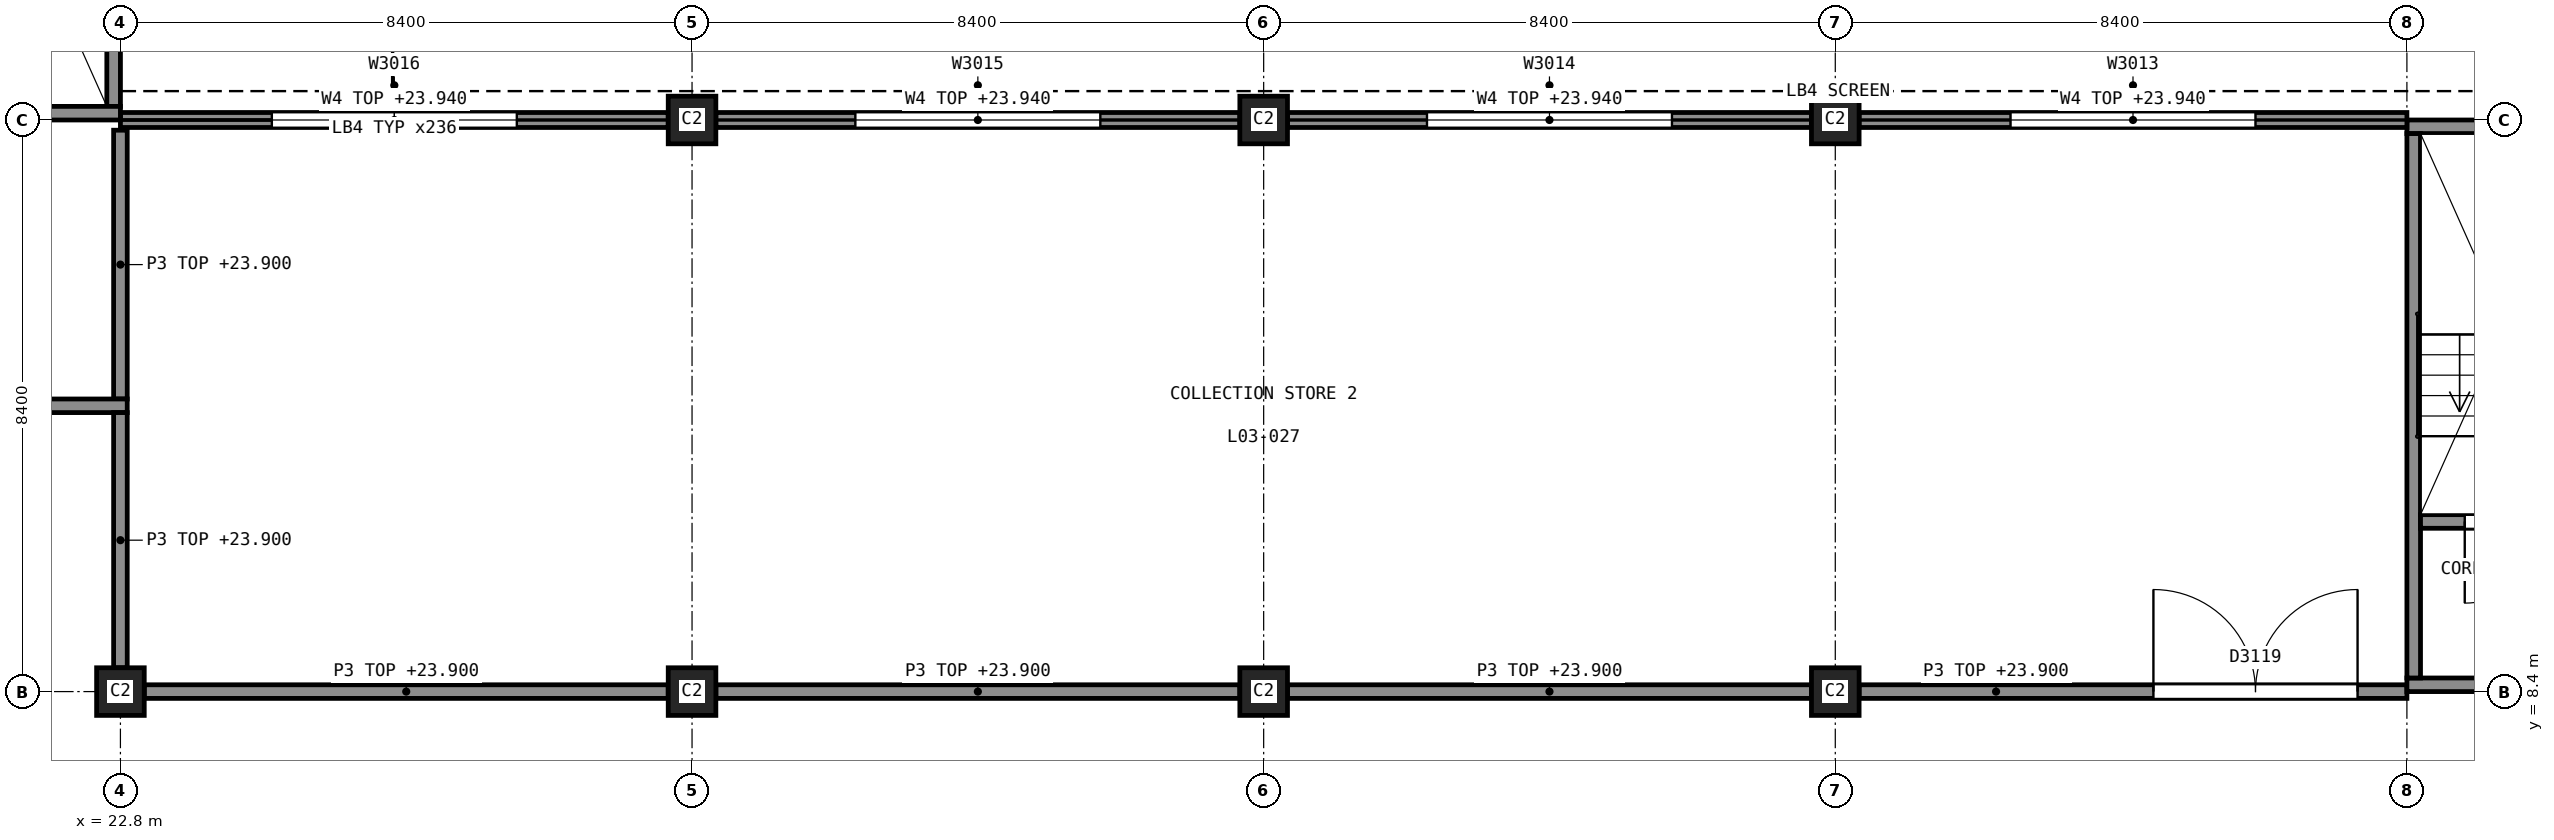
"""IFC4 building model, lengths in metres.
Left out: names, types, materials, properties, quantities, classifications, styles, units other than length and angle.
Written with IfcOpenShell. Run it as: python <this file> out.ifc"""

import sys

from ifc_helpers import new_model, si_unit, direction, frame, frame_2d, origin, origin_2d, place, context, subcontext, project, spatial, rectangle, extrude, element, fill, save


model = new_model("IFC4")
c1 = context("Model", 3, precision=1e-05, world=origin(), true_north=direction((0.0, 1.0)))
c2 = subcontext(c1, "Body", "Model", "MODEL_VIEW")
j1 = project(units=[si_unit("LENGTHUNIT", "METRE"), si_unit("PLANEANGLEUNIT", "RADIAN")], contexts=[c1])
p1 = place(None, origin())
s1 = spatial("IfcSite", under=j1, at=p1, CompositionType="ELEMENT")
p2 = place(p1, origin())
s2 = spatial("IfcBuilding", under=s1, at=p2, CompositionType="ELEMENT")
p3 = place(p2, frame((0.0, 0.0, 20.0)))
s3 = spatial("IfcBuildingStorey", under=s2, at=p3, CompositionType="ELEMENT", Elevation=20.0)
p4 = place(p3, frame((14.4, 16.9, 0.0), z_axis=(0.0, 0.0, 1.0), x_axis=(1.0, 0.0, 0.0)))
e1 = element("IfcWall", 1, at=p4, inside=s3, PredefinedType="SHEAR", context=c2, shape_type="SweptSolid", body=[
    extrude(rectangle(XDim=8.4, YDim=0.2, at=frame_2d((4.2, 0.0))), origin(), (0.0, 0.0, 1.0), 8.8),
])
p5 = place(p3, frame((22.7, 17.0, 0.0), z_axis=(0.0, 0.0, 1.0), x_axis=(0.0, 1.0, 0.0)))
e2 = element("IfcWall", 2, at=p5, inside=s3, PredefinedType="SHEAR", context=c2, shape_type="SweptSolid", body=[
    extrude(rectangle(XDim=8.0, YDim=0.2, at=frame_2d((4.0, 0.0))), origin(), (0.0, 0.0, 1.0), 8.775),
])
p6 = place(p3, frame((56.4, 8.5, 0.0), z_axis=(0.0, 0.0, 1.0), x_axis=(1.0, 0.0, 0.0)))
e3 = element("IfcWall", 3, at=p6, inside=s3, PredefinedType="SHEAR", context=c2, shape_type="SweptSolid", body=[
    extrude(rectangle(XDim=8.4, YDim=0.2, at=frame_2d((4.2, 0.0))), origin(), (0.0, 0.0, 1.0), 5.0),
])
p7 = place(p6, frame((3.3, 0.0, 0.0)))
e4 = element("IfcOpeningElement", 4, at=p7, cuts=e3, PredefinedType="OPENING", context=c2, shape_type="SweptSolid", body=[
    extrude(rectangle(XDim=1.8, YDim=2.1, at=frame_2d((0.9, 1.05))), frame((0.0, 0.11, 0.0), z_axis=(0.0, -1.0, 0.0), x_axis=(1.0, 0.0, 0.0)), (0.0, 0.0, 1.0), 0.22),
])
p8 = place(p3, frame((56.4, 16.7, 0.0), z_axis=(0.0, 0.0, 1.0), x_axis=(1.0, 0.0, 0.0)))
e5 = element("IfcWall", 5, at=p8, inside=s3, PredefinedType="SHEAR", context=c2, shape_type="SweptSolid", body=[
    extrude(rectangle(XDim=8.4, YDim=0.2, at=frame_2d((4.2, 0.0))), origin(), (0.0, 0.0, 1.0), 5.0),
])
p9 = place(p3, frame((56.5, 8.6, 0.0), z_axis=(0.0, 0.0, 1.0), x_axis=(0.0, 1.0, 0.0)))
e6 = element("IfcWall", 6, at=p9, inside=s3, PredefinedType="SHEAR", context=c2, shape_type="SweptSolid", body=[
    extrude(rectangle(XDim=8.0, YDim=0.2, at=frame_2d((4.0, 0.0))), origin(), (0.0, 0.0, 1.0), 5.0),
])
p10 = place(p3, frame((56.6, 10.9, 0.0), z_axis=(0.0, 0.0, 1.0), x_axis=(1.0, 0.0, 0.0)))
e7 = element("IfcWall", 7, at=p10, inside=s3, PredefinedType="SHEAR", context=c2, shape_type="SweptSolid", body=[
    extrude(rectangle(XDim=8.0, YDim=0.2, at=frame_2d((4.0, 0.0))), origin(), (0.0, 0.0, 1.0), 5.0),
])
p11 = place(p10, frame((0.65, 0.0, 0.0)))
e8 = element("IfcOpeningElement", 8, at=p11, cuts=e7, PredefinedType="OPENING", context=c2, shape_type="SweptSolid", body=[
    extrude(rectangle(XDim=1.2, YDim=2.1, at=frame_2d((0.6, 1.05))), frame((0.0, 0.11, 0.0), z_axis=(0.0, -1.0, 0.0), x_axis=(1.0, 0.0, 0.0)), (0.0, 0.0, 1.0), 0.22),
])
p12 = place(p10, frame((6.15, 0.0, 0.0)))
e9 = element("IfcOpeningElement", 9, at=p12, cuts=e7, PredefinedType="OPENING", context=c2, shape_type="SweptSolid", body=[
    extrude(rectangle(XDim=1.2, YDim=2.1, at=frame_2d((0.6, 1.05))), frame((0.0, 0.11, 0.0), z_axis=(0.0, -1.0, 0.0), x_axis=(1.0, 0.0, 0.0)), (0.0, 0.0, 1.0), 0.22),
])
p13 = place(p10, frame((3.45, 0.0, 0.0)))
e10 = element("IfcOpeningElement", 10, at=p13, cuts=e7, PredefinedType="OPENING", context=c2, shape_type="SweptSolid", body=[
    extrude(rectangle(XDim=1.1, YDim=2.1, at=frame_2d((0.55, 1.05))), frame((0.0, 0.11, 0.0), z_axis=(0.0, -1.0, 0.0), x_axis=(1.0, 0.0, 0.0)), (0.0, 0.0, 1.0), 0.22),
])
for number, where, z_axis, x_axis in (
    (11, (22.8, 8.4, 0.0), (0.0, 0.0, 1.0), (1.0, 0.0, 0.0)),
    (12, (31.2, 8.4, 0.0), (0.0, 0.0, 1.0), (1.0, 0.0, 0.0)),
    (13, (31.2, 16.8, 0.0), (0.0, 0.0, 1.0), (1.0, 0.0, 0.0)),
    (14, (39.6, 8.4, 0.0), (0.0, 0.0, 1.0), (1.0, 0.0, 0.0)),
    (15, (39.6, 16.8, 0.0), (0.0, 0.0, 1.0), (1.0, 0.0, 0.0)),
    (16, (48.0, 8.4, 0.0), (0.0, 0.0, 1.0), (1.0, 0.0, 0.0)),
    (17, (48.0, 16.8, 0.0), (0.0, 0.0, 1.0), (1.0, 0.0, 0.0)),
):
    element("IfcColumn", number, at=place(p3, frame(where, z_axis=z_axis, x_axis=x_axis)), inside=s3, PredefinedType="COLUMN", context=c2, shape_type="SweptSolid", body=[
        extrude(rectangle(XDim=0.7, YDim=0.7, at=origin_2d()), origin(), (0.0, 0.0, 1.0), 5.0),
    ])
p14 = place(p3, frame((48.35, 16.8, 0.0), z_axis=(0.0, 0.0, 1.0), x_axis=(1.0, 0.0, 0.0)))
e18 = element("IfcWall", 18, at=p14, inside=s3, PredefinedType="SOLIDWALL", context=c2, shape_type="SweptSolid", body=[
    extrude(rectangle(XDim=8.05, YDim=0.22, at=frame_2d((4.025, 0.0))), origin(), (0.0, 0.0, 1.0), 3.94),
])
p15 = place(p14, frame((2.225, 0.0, 0.9)))
e19 = element("IfcOpeningElement", 19, at=p15, cuts=e18, PredefinedType="OPENING", context=c2, shape_type="SweptSolid", body=[
    extrude(rectangle(XDim=3.6, YDim=1.5, at=frame_2d((1.8, 0.75))), frame((0.0, 0.12, 0.0), z_axis=(0.0, -1.0, 0.0), x_axis=(1.0, 0.0, 0.0)), (0.0, 0.0, 1.0), 0.24),
])
p16 = place(p3, frame((39.95, 16.8, 0.0), z_axis=(0.0, 0.0, 1.0), x_axis=(1.0, 0.0, 0.0)))
e20 = element("IfcWall", 20, at=p16, inside=s3, PredefinedType="SOLIDWALL", context=c2, shape_type="SweptSolid", body=[
    extrude(rectangle(XDim=7.7, YDim=0.22, at=frame_2d((3.85, 0.0))), origin(), (0.0, 0.0, 1.0), 3.94),
])
p17 = place(p16, frame((2.05, 0.0, 0.9)))
e21 = element("IfcOpeningElement", 21, at=p17, cuts=e20, PredefinedType="OPENING", context=c2, shape_type="SweptSolid", body=[
    extrude(rectangle(XDim=3.6, YDim=1.5, at=frame_2d((1.8, 0.75))), frame((0.0, 0.12, 0.0), z_axis=(0.0, -1.0, 0.0), x_axis=(1.0, 0.0, 0.0)), (0.0, 0.0, 1.0), 0.24),
])
p18 = place(p3, frame((31.55, 16.8, 0.0), z_axis=(0.0, 0.0, 1.0), x_axis=(1.0, 0.0, 0.0)))
e22 = element("IfcWall", 22, at=p18, inside=s3, PredefinedType="SOLIDWALL", context=c2, shape_type="SweptSolid", body=[
    extrude(rectangle(XDim=7.7, YDim=0.22, at=frame_2d((3.85, 0.0))), origin(), (0.0, 0.0, 1.0), 3.94),
])
p19 = place(p18, frame((2.05, 0.0, 0.9)))
e23 = element("IfcOpeningElement", 23, at=p19, cuts=e22, PredefinedType="OPENING", context=c2, shape_type="SweptSolid", body=[
    extrude(rectangle(XDim=3.6, YDim=1.5, at=frame_2d((1.8, 0.75))), frame((0.0, 0.12, 0.0), z_axis=(0.0, -1.0, 0.0), x_axis=(1.0, 0.0, 0.0)), (0.0, 0.0, 1.0), 0.24),
])
p20 = place(p3, frame((22.8, 16.8, 0.0), z_axis=(0.0, 0.0, 1.0), x_axis=(1.0, 0.0, 0.0)))
e24 = element("IfcWall", 24, at=p20, inside=s3, PredefinedType="SOLIDWALL", context=c2, shape_type="SweptSolid", body=[
    extrude(rectangle(XDim=8.05, YDim=0.22, at=frame_2d((4.025, 0.0))), origin(), (0.0, 0.0, 1.0), 3.94),
])
p21 = place(p20, frame((2.225, 0.0, 0.9)))
e25 = element("IfcOpeningElement", 25, at=p21, cuts=e24, PredefinedType="OPENING", context=c2, shape_type="SweptSolid", body=[
    extrude(rectangle(XDim=3.6, YDim=1.5, at=frame_2d((1.8, 0.75))), frame((0.0, 0.12, 0.0), z_axis=(0.0, -1.0, 0.0), x_axis=(1.0, 0.0, 0.0)), (0.0, 0.0, 1.0), 0.24),
])
p22 = place(p3, frame((22.8, 12.7, 0.0), z_axis=(0.0, 0.0, 1.0), x_axis=(0.0, 1.0, 0.0)))
e26 = element("IfcWall", 26, at=p22, inside=s3, PredefinedType="PARTITIONING", context=c2, shape_type="SweptSolid", body=[
    extrude(rectangle(XDim=3.95, YDim=0.2, at=frame_2d((1.975, 0.0))), origin(), (0.0, 0.0, 1.0), 3.9),
])
p23 = place(p3, frame((14.4, 12.6, 0.0), z_axis=(0.0, 0.0, 1.0), x_axis=(1.0, 0.0, 0.0)))
e27 = element("IfcWall", 27, at=p23, inside=s3, PredefinedType="PARTITIONING", context=c2, shape_type="SweptSolid", body=[
    extrude(rectangle(XDim=8.5, YDim=0.2, at=frame_2d((4.25, 0.0))), origin(), (0.0, 0.0, 1.0), 3.9),
])
p24 = place(p23, frame((1.775, 0.0, 0.0)))
e28 = element("IfcOpeningElement", 28, at=p24, cuts=e27, PredefinedType="OPENING", context=c2, shape_type="SweptSolid", body=[
    extrude(rectangle(XDim=1.0, YDim=2.1, at=frame_2d((0.5, 1.05))), frame((0.0, 0.11, 0.0), z_axis=(0.0, -1.0, 0.0), x_axis=(1.0, 0.0, 0.0)), (0.0, 0.0, 1.0), 0.22),
])
p25 = place(p3, frame((23.15, 8.4, 0.0), z_axis=(0.0, 0.0, 1.0), x_axis=(1.0, 0.0, 0.0)))
e29 = element("IfcWall", 29, at=p25, inside=s3, PredefinedType="PARTITIONING", context=c2, shape_type="SweptSolid", body=[
    extrude(rectangle(XDim=7.7, YDim=0.2, at=frame_2d((3.85, 0.0))), origin(), (0.0, 0.0, 1.0), 3.9),
])
for number, where, z_axis, x_axis in (
    (30, (31.55, 8.4, 0.0), (0.0, 0.0, 1.0), (1.0, 0.0, 0.0)),
    (31, (39.95, 8.4, 0.0), (0.0, 0.0, 1.0), (1.0, 0.0, 0.0)),
):
    element("IfcWall", number, at=place(p3, frame(where, z_axis=z_axis, x_axis=x_axis)), inside=s3, PredefinedType="PARTITIONING", context=c2, shape_type="SweptSolid", body=[
        extrude(rectangle(XDim=7.7, YDim=0.2, at=frame_2d((3.85, 0.0))), origin(), (0.0, 0.0, 1.0), 3.9),
    ])
p26 = place(p3, frame((48.35, 8.4, 0.0), z_axis=(0.0, 0.0, 1.0), x_axis=(1.0, 0.0, 0.0)))
e32 = element("IfcWall", 32, at=p26, inside=s3, PredefinedType="PARTITIONING", context=c2, shape_type="SweptSolid", body=[
    extrude(rectangle(XDim=8.05, YDim=0.2, at=frame_2d((4.025, 0.0))), origin(), (0.0, 0.0, 1.0), 3.9),
])
p27 = place(p26, frame((4.325, 0.0, 0.0)))
e33 = element("IfcOpeningElement", 33, at=p27, cuts=e32, PredefinedType="OPENING", context=c2, shape_type="SweptSolid", body=[
    extrude(rectangle(XDim=3.0, YDim=3.0, at=frame_2d((1.5, 1.5))), frame((0.0, 0.11, 0.0), z_axis=(0.0, -1.0, 0.0), x_axis=(1.0, 0.0, 0.0)), (0.0, 0.0, 1.0), 0.22),
])
p28 = place(p3, frame((22.8, 8.75, 0.0), z_axis=(0.0, 0.0, 1.0), x_axis=(0.0, 1.0, 0.0)))
e34 = element("IfcWall", 34, at=p28, inside=s3, PredefinedType="PARTITIONING", context=c2, shape_type="SweptSolid", body=[
    extrude(rectangle(XDim=3.75, YDim=0.2, at=frame_2d((1.875, 0.0))), origin(), (0.0, 0.0, 1.0), 3.9),
])
p29 = place(p15, origin())
e35 = element("IfcWindow", 35, at=p29, inside=s3, PartitioningType="DOUBLE_PANEL_VERTICAL", PredefinedType="WINDOW", context=c2, shape_type="SweptSolid", body=[
    extrude(rectangle(XDim=3.6, YDim=1.5, at=frame_2d((1.8, 0.75))), frame((0.0, -0.03, 0.0), z_axis=(0.0, -1.0, 0.0), x_axis=(1.0, 0.0, 0.0)), (0.0, 0.0, 1.0), 0.06),
])
fill(e19, e35)
p30 = place(p17, origin())
e36 = element("IfcWindow", 36, at=p30, inside=s3, PartitioningType="DOUBLE_PANEL_VERTICAL", PredefinedType="WINDOW", context=c2, shape_type="SweptSolid", body=[
    extrude(rectangle(XDim=3.6, YDim=1.5, at=frame_2d((1.8, 0.75))), frame((0.0, -0.03, 0.0), z_axis=(0.0, -1.0, 0.0), x_axis=(1.0, 0.0, 0.0)), (0.0, 0.0, 1.0), 0.06),
])
fill(e21, e36)
p31 = place(p19, origin())
e37 = element("IfcWindow", 37, at=p31, inside=s3, PartitioningType="DOUBLE_PANEL_VERTICAL", PredefinedType="WINDOW", context=c2, shape_type="SweptSolid", body=[
    extrude(rectangle(XDim=3.6, YDim=1.5, at=frame_2d((1.8, 0.75))), frame((0.0, -0.03, 0.0), z_axis=(0.0, -1.0, 0.0), x_axis=(1.0, 0.0, 0.0)), (0.0, 0.0, 1.0), 0.06),
])
fill(e23, e37)
p32 = place(p21, origin())
e38 = element("IfcWindow", 38, at=p32, inside=s3, PartitioningType="DOUBLE_PANEL_VERTICAL", PredefinedType="WINDOW", context=c2, shape_type="SweptSolid", body=[
    extrude(rectangle(XDim=3.6, YDim=1.5, at=frame_2d((1.8, 0.75))), frame((0.0, -0.03, 0.0), z_axis=(0.0, -1.0, 0.0), x_axis=(1.0, 0.0, 0.0)), (0.0, 0.0, 1.0), 0.06),
])
fill(e25, e38)
p33 = place(p27, origin())
e39 = element("IfcDoor", 39, at=p33, inside=s3, OperationType="DOUBLE_DOOR_SINGLE_SWING", PredefinedType="DOOR", context=c2, shape_type="SweptSolid", body=[
    extrude(rectangle(XDim=3.0, YDim=3.0, at=frame_2d((1.5, 1.5))), frame((0.0, 0.025, 0.0), z_axis=(0.0, -1.0, 0.0), x_axis=(1.0, 0.0, 0.0)), (0.0, 0.0, 1.0), 0.05),
])
fill(e33, e39)
p34 = place(p11, origin())
e40 = element("IfcDoor", 40, at=p34, inside=s3, OperationType="SINGLE_SWING_LEFT", PredefinedType="DOOR", context=c2, shape_type="SweptSolid", body=[
    extrude(rectangle(XDim=1.2, YDim=2.1, at=frame_2d((0.6, 1.05))), frame((0.0, 0.025, 0.0), z_axis=(0.0, -1.0, 0.0), x_axis=(1.0, 0.0, 0.0)), (0.0, 0.0, 1.0), 0.05),
])
fill(e8, e40)
save(model, sys.argv[1])
